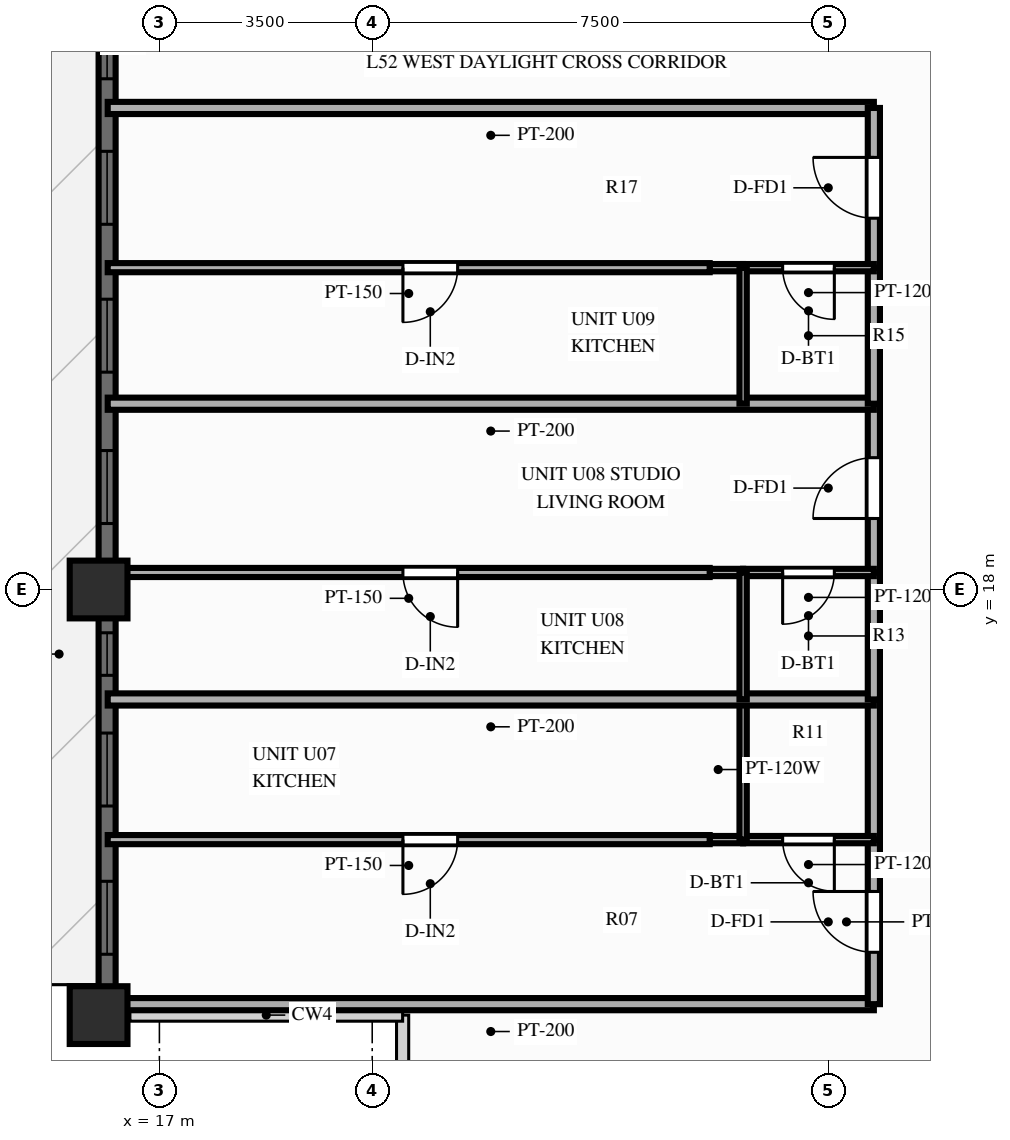
"""IFC4 building model, lengths in metres.
Left out: names, types, materials, properties, quantities, classifications, styles, units other than length and angle.
Written with IfcOpenShell. Run it as: python <this file> out.ifc"""

import sys

from ifc_helpers import new_model, si_unit, direction, frame, frame_2d, origin, origin_2d, place, context, subcontext, project, spatial, rectangle, extrude, source, transform, mapped, element, fill, save


model = new_model("IFC4")
c1 = context("Model", 3, precision=1e-05, world=origin(), true_north=direction((0.0, 1.0)))
c2 = subcontext(c1, "Body", "Model", "MODEL_VIEW")
j1 = project(units=[si_unit("LENGTHUNIT", "METRE"), si_unit("PLANEANGLEUNIT", "RADIAN")], contexts=[c1])
p1 = place(None, origin())
s1 = spatial("IfcSite", under=j1, at=p1, CompositionType="ELEMENT")
p2 = place(p1, origin())
s2 = spatial("IfcBuilding", under=s1, at=p2, CompositionType="ELEMENT")
p3 = place(p2, frame((0.0, 0.0, 166.0)))
s3 = spatial("IfcBuildingStorey", under=s2, at=p3, CompositionType="ELEMENT", Elevation=166.0)
m1 = source(origin(), c2, "Body", "SweptSolid", [
    extrude(rectangle(XDim=0.95, YDim=0.95, at=origin_2d()), origin(), (0.0, 0.0, 1.0), 3.0),
])
for number, where, z_axis, x_axis in (
    (1, (16.0, 18.0, 0.0), (0.0, 0.0, 1.0), (1.0, 0.0, 0.0)),
    (2, (16.0, 11.0, 0.0), (0.0, 0.0, 1.0), (1.0, 0.0, 0.0)),
):
    element("IfcColumn", number, at=place(p3, frame(where, z_axis=z_axis, x_axis=x_axis)), inside=s3, PredefinedType="COLUMN", context=c2, shape_type="MappedRepresentation", body=[
        mapped(m1, transform((0.0, 0.0, 0.0), scale=1.0)),
    ])
p4 = place(p3, frame((16.14, 11.0, 0.0), z_axis=(0.0, 0.0, 1.0), x_axis=(0.0, 1.0, 0.0)))
e3 = element("IfcWall", 3, at=p4, inside=s3, PredefinedType="SOLIDWALL", context=c2, shape_type="SweptSolid", body=[
    extrude(rectangle(XDim=32.0, YDim=0.28, at=frame_2d((16.0, 0.0))), origin(), (0.0, 0.0, 1.0), 2.28),
])
p5 = place(p4, frame((1.001, 0.0, 0.25)))
e4 = element("IfcOpeningElement", 4, at=p5, cuts=e3, PredefinedType="OPENING", context=c2, shape_type="SweptSolid", body=[
    extrude(rectangle(XDim=1.2, YDim=1.5, at=frame_2d((0.6, 0.75))), frame((0.0, 0.152, 0.0), z_axis=(0.0, -1.0, 0.0), x_axis=(1.0, 0.0, 0.0)), (0.0, 0.0, 1.0), 0.304),
])
p6 = place(p4, frame((3.439, 0.0, 0.25)))
e5 = element("IfcOpeningElement", 5, at=p6, cuts=e3, PredefinedType="OPENING", context=c2, shape_type="SweptSolid", body=[
    extrude(rectangle(XDim=1.2, YDim=1.5, at=frame_2d((0.6, 0.75))), frame((0.0, 0.152, 0.0), z_axis=(0.0, -1.0, 0.0), x_axis=(1.0, 0.0, 0.0)), (0.0, 0.0, 1.0), 0.304),
])
p7 = place(p4, frame((5.588, 0.0, 0.25)))
e6 = element("IfcOpeningElement", 6, at=p7, cuts=e3, PredefinedType="OPENING", context=c2, shape_type="SweptSolid", body=[
    extrude(rectangle(XDim=0.7, YDim=1.5, at=frame_2d((0.35, 0.75))), frame((0.0, 0.152, 0.0), z_axis=(0.0, -1.0, 0.0), x_axis=(1.0, 0.0, 0.0)), (0.0, 0.0, 1.0), 0.304),
])
p8 = place(p4, frame((8.085, 0.0, 0.25)))
e7 = element("IfcOpeningElement", 7, at=p8, cuts=e3, PredefinedType="OPENING", context=c2, shape_type="SweptSolid", body=[
    extrude(rectangle(XDim=1.2, YDim=1.5, at=frame_2d((0.6, 0.75))), frame((0.0, 0.152, 0.0), z_axis=(0.0, -1.0, 0.0), x_axis=(1.0, 0.0, 0.0)), (0.0, 0.0, 1.0), 0.304),
])
p9 = place(p4, frame((10.575, 0.0, 0.25)))
e8 = element("IfcOpeningElement", 8, at=p9, cuts=e3, PredefinedType="OPENING", context=c2, shape_type="SweptSolid", body=[
    extrude(rectangle(XDim=1.2, YDim=1.5, at=frame_2d((0.6, 0.75))), frame((0.0, 0.152, 0.0), z_axis=(0.0, -1.0, 0.0), x_axis=(1.0, 0.0, 0.0)), (0.0, 0.0, 1.0), 0.304),
])
p10 = place(p4, frame((13.007, 0.0, 0.25)))
e9 = element("IfcOpeningElement", 9, at=p10, cuts=e3, PredefinedType="OPENING", context=c2, shape_type="SweptSolid", body=[
    extrude(rectangle(XDim=1.2, YDim=1.5, at=frame_2d((0.6, 0.75))), frame((0.0, 0.152, 0.0), z_axis=(0.0, -1.0, 0.0), x_axis=(1.0, 0.0, 0.0)), (0.0, 0.0, 1.0), 0.304),
])
p11 = place(p4, frame((15.4, 0.0, 0.25)))
e10 = element("IfcOpeningElement", 10, at=p11, cuts=e3, PredefinedType="OPENING", context=c2, shape_type="SweptSolid", body=[
    extrude(rectangle(XDim=1.2, YDim=1.5, at=frame_2d((0.6, 0.75))), frame((0.0, 0.152, 0.0), z_axis=(0.0, -1.0, 0.0), x_axis=(1.0, 0.0, 0.0)), (0.0, 0.0, 1.0), 0.304),
])
p12 = place(p4, frame((17.673, 0.0, 0.0)))
e11 = element("IfcOpeningElement", 11, at=p12, cuts=e3, PredefinedType="OPENING", context=c2, shape_type="SweptSolid", body=[
    extrude(rectangle(XDim=1.6, YDim=2.15, at=frame_2d((0.8, 1.075))), frame((0.0, 0.152, 0.0), z_axis=(0.0, -1.0, 0.0), x_axis=(1.0, 0.0, 0.0)), (0.0, 0.0, 1.0), 0.304),
])
p13 = place(p4, frame((20.452, 0.0, 0.25)))
e12 = element("IfcOpeningElement", 12, at=p13, cuts=e3, PredefinedType="OPENING", context=c2, shape_type="SweptSolid", body=[
    extrude(rectangle(XDim=1.2, YDim=1.5, at=frame_2d((0.6, 0.75))), frame((0.0, 0.152, 0.0), z_axis=(0.0, -1.0, 0.0), x_axis=(1.0, 0.0, 0.0)), (0.0, 0.0, 1.0), 0.304),
])
p14 = place(p4, frame((22.862, 0.0, 0.25)))
e13 = element("IfcOpeningElement", 13, at=p14, cuts=e3, PredefinedType="OPENING", context=c2, shape_type="SweptSolid", body=[
    extrude(rectangle(XDim=1.2, YDim=1.5, at=frame_2d((0.6, 0.75))), frame((0.0, 0.152, 0.0), z_axis=(0.0, -1.0, 0.0), x_axis=(1.0, 0.0, 0.0)), (0.0, 0.0, 1.0), 0.304),
])
p15 = place(p4, frame((25.734, 0.0, 0.25)))
e14 = element("IfcOpeningElement", 14, at=p15, cuts=e3, PredefinedType="OPENING", context=c2, shape_type="SweptSolid", body=[
    extrude(rectangle(XDim=0.95, YDim=1.5, at=frame_2d((0.475, 0.75))), frame((0.0, 0.152, 0.0), z_axis=(0.0, -1.0, 0.0), x_axis=(1.0, 0.0, 0.0)), (0.0, 0.0, 1.0), 0.304),
])
p16 = place(p4, frame((27.588, 0.0, 0.25)))
e15 = element("IfcOpeningElement", 15, at=p16, cuts=e3, PredefinedType="OPENING", context=c2, shape_type="SweptSolid", body=[
    extrude(rectangle(XDim=1.2, YDim=1.5, at=frame_2d((0.6, 0.75))), frame((0.0, 0.152, 0.0), z_axis=(0.0, -1.0, 0.0), x_axis=(1.0, 0.0, 0.0)), (0.0, 0.0, 1.0), 0.304),
])
p17 = place(p4, frame((29.879, 0.0, 0.25)))
e16 = element("IfcOpeningElement", 16, at=p17, cuts=e3, PredefinedType="OPENING", context=c2, shape_type="SweptSolid", body=[
    extrude(rectangle(XDim=1.2, YDim=1.5, at=frame_2d((0.6, 0.75))), frame((0.0, 0.152, 0.0), z_axis=(0.0, -1.0, 0.0), x_axis=(1.0, 0.0, 0.0)), (0.0, 0.0, 1.0), 0.304),
])
for number, where, z_axis, x_axis in (
    (17, (28.75, 11.18, 0.0), (0.0, 0.0, 1.0), (-1.0, 0.0, 0.0)),
    (18, (28.75, 25.92, 0.0), (0.0, 0.0, 1.0), (-1.0, 0.0, 0.0)),
):
    element("IfcWall", number, at=place(p3, frame(where, z_axis=z_axis, x_axis=x_axis)), inside=s3, PredefinedType="PARTITIONING", context=c2, shape_type="SweptSolid", body=[
        extrude(rectangle(XDim=12.6, YDim=0.2, at=frame_2d((6.3, 0.0))), origin(), (0.0, 0.0, 1.0), 2.79),
    ])
p18 = place(p3, frame((28.75, 11.18, 0.0), z_axis=(0.0, 0.0, 1.0), x_axis=(0.0, 1.0, 0.0)))
e19 = element("IfcWall", 19, at=p18, inside=s3, PredefinedType="PARTITIONING", context=c2, shape_type="SweptSolid", body=[
    extrude(rectangle(XDim=2.706, YDim=0.2, at=frame_2d((1.353, 0.0))), origin(), (0.0, 0.0, 1.0), 2.79),
])
p19 = place(p18, frame((0.853, 0.0, 0.0)))
e20 = element("IfcOpeningElement", 20, at=p19, cuts=e19, PredefinedType="OPENING", context=c2, shape_type="SweptSolid", body=[
    extrude(rectangle(XDim=1.0, YDim=2.15, at=frame_2d((0.5, 1.075))), frame((0.0, 0.112, 0.0), z_axis=(0.0, -1.0, 0.0), x_axis=(1.0, 0.0, 0.0)), (0.0, 0.0, 1.0), 0.224),
])
p20 = place(p3, frame((28.75, 13.886, 0.0), z_axis=(0.0, 0.0, 1.0), x_axis=(0.0, 1.0, 0.0)))
e21 = element("IfcWall", 21, at=p20, inside=s3, PredefinedType="PARTITIONING", context=c2, shape_type="SweptSolid", body=[
    extrude(rectangle(XDim=2.305, YDim=0.2, at=frame_2d((1.153, 0.0))), origin(), (0.0, 0.0, 1.0), 2.79),
])
p21 = place(p3, frame((28.75, 13.886, 0.0), z_axis=(0.0, 0.0, 1.0), x_axis=(-1.0, 0.0, 0.0)))
e22 = element("IfcWall", 22, at=p21, inside=s3, PredefinedType="PARTITIONING", context=c2, shape_type="SweptSolid", body=[
    extrude(rectangle(XDim=2.15, YDim=0.12, at=frame_2d((1.075, 0.0))), origin(), (0.0, 0.0, 1.0), 2.79),
])
p22 = place(p21, frame((0.65, 0.0, 0.0)))
e23 = element("IfcOpeningElement", 23, at=p22, cuts=e22, PredefinedType="OPENING", context=c2, shape_type="SweptSolid", body=[
    extrude(rectangle(XDim=0.85, YDim=2.05, at=frame_2d((0.425, 1.025))), frame((0.0, 0.072, 0.0), z_axis=(0.0, -1.0, 0.0), x_axis=(1.0, 0.0, 0.0)), (0.0, 0.0, 1.0), 0.144),
])
p23 = place(p3, frame((26.6, 13.886, 0.0), z_axis=(0.0, 0.0, 1.0), x_axis=(-1.0, 0.0, 0.0)))
e24 = element("IfcWall", 24, at=p23, inside=s3, PredefinedType="PARTITIONING", context=c2, shape_type="SweptSolid", body=[
    extrude(rectangle(XDim=0.55, YDim=0.12, at=frame_2d((0.275, 0.0))), origin(), (0.0, 0.0, 1.0), 2.79),
])
p24 = place(p3, frame((26.6, 13.886, 0.0), z_axis=(0.0, 0.0, 1.0), x_axis=(0.0, 1.0, 0.0)))
e25 = element("IfcWall", 25, at=p24, inside=s3, PredefinedType="PARTITIONING", context=c2, shape_type="SweptSolid", body=[
    extrude(rectangle(XDim=2.305, YDim=0.12, at=frame_2d((1.153, 0.0))), origin(), (0.0, 0.0, 1.0), 2.79),
])
p25 = place(p3, frame((26.05, 13.886, 0.0), z_axis=(0.0, 0.0, 1.0), x_axis=(-1.0, 0.0, 0.0)))
e26 = element("IfcWall", 26, at=p25, inside=s3, PredefinedType="PARTITIONING", context=c2, shape_type="SweptSolid", body=[
    extrude(rectangle(XDim=9.9, YDim=0.15, at=frame_2d((4.95, 0.0))), origin(), (0.0, 0.0, 1.0), 2.79),
])
p26 = place(p25, frame((4.145, 0.0, 0.0)))
e27 = element("IfcOpeningElement", 27, at=p26, cuts=e26, PredefinedType="OPENING", context=c2, shape_type="SweptSolid", body=[
    extrude(rectangle(XDim=0.9, YDim=2.1, at=frame_2d((0.45, 1.05))), frame((0.0, 0.087, 0.0), z_axis=(0.0, -1.0, 0.0), x_axis=(1.0, 0.0, 0.0)), (0.0, 0.0, 1.0), 0.174),
])
p27 = place(p3, frame((28.75, 16.192, 0.0), z_axis=(0.0, 0.0, 1.0), x_axis=(-1.0, 0.0, 0.0)))
e28 = element("IfcWall", 28, at=p27, inside=s3, PredefinedType="PARTITIONING", context=c2, shape_type="SweptSolid", body=[
    extrude(rectangle(XDim=12.6, YDim=0.2, at=frame_2d((6.3, 0.0))), origin(), (0.0, 0.0, 1.0), 2.79),
])
p28 = place(p3, frame((28.75, 16.192, 0.0), z_axis=(0.0, 0.0, 1.0), x_axis=(0.0, 1.0, 0.0)))
e29 = element("IfcWall", 29, at=p28, inside=s3, PredefinedType="PARTITIONING", context=c2, shape_type="SweptSolid", body=[
    extrude(rectangle(XDim=2.088, YDim=0.2, at=frame_2d((1.044, 0.0))), origin(), (0.0, 0.0, 1.0), 2.79),
])
p29 = place(p3, frame((28.75, 18.28, 0.0), z_axis=(0.0, 0.0, 1.0), x_axis=(0.0, 1.0, 0.0)))
e30 = element("IfcWall", 30, at=p29, inside=s3, PredefinedType="PARTITIONING", context=c2, shape_type="SweptSolid", body=[
    extrude(rectangle(XDim=2.776, YDim=0.2, at=frame_2d((1.388, 0.0))), origin(), (0.0, 0.0, 1.0), 2.79),
])
p30 = place(p29, frame((0.888, 0.0, 0.0)))
e31 = element("IfcOpeningElement", 31, at=p30, cuts=e30, PredefinedType="OPENING", context=c2, shape_type="SweptSolid", body=[
    extrude(rectangle(XDim=1.0, YDim=2.15, at=frame_2d((0.5, 1.075))), frame((0.0, 0.112, 0.0), z_axis=(0.0, -1.0, 0.0), x_axis=(1.0, 0.0, 0.0)), (0.0, 0.0, 1.0), 0.224),
])
p31 = place(p3, frame((28.75, 18.28, 0.0), z_axis=(0.0, 0.0, 1.0), x_axis=(-1.0, 0.0, 0.0)))
e32 = element("IfcWall", 32, at=p31, inside=s3, PredefinedType="PARTITIONING", context=c2, shape_type="SweptSolid", body=[
    extrude(rectangle(XDim=2.15, YDim=0.12, at=frame_2d((1.075, 0.0))), origin(), (0.0, 0.0, 1.0), 2.79),
])
p32 = place(p31, frame((0.65, 0.0, 0.0)))
e33 = element("IfcOpeningElement", 33, at=p32, cuts=e32, PredefinedType="OPENING", context=c2, shape_type="SweptSolid", body=[
    extrude(rectangle(XDim=0.85, YDim=2.05, at=frame_2d((0.425, 1.025))), frame((0.0, 0.072, 0.0), z_axis=(0.0, -1.0, 0.0), x_axis=(1.0, 0.0, 0.0)), (0.0, 0.0, 1.0), 0.144),
])
p33 = place(p3, frame((26.6, 18.28, 0.0), z_axis=(0.0, 0.0, 1.0), x_axis=(-1.0, 0.0, 0.0)))
e34 = element("IfcWall", 34, at=p33, inside=s3, PredefinedType="PARTITIONING", context=c2, shape_type="SweptSolid", body=[
    extrude(rectangle(XDim=0.55, YDim=0.12, at=frame_2d((0.275, 0.0))), origin(), (0.0, 0.0, 1.0), 2.79),
])
p34 = place(p3, frame((26.6, 16.192, 0.0), z_axis=(0.0, 0.0, 1.0), x_axis=(0.0, 1.0, 0.0)))
e35 = element("IfcWall", 35, at=p34, inside=s3, PredefinedType="PARTITIONING", context=c2, shape_type="SweptSolid", body=[
    extrude(rectangle(XDim=2.088, YDim=0.12, at=frame_2d((1.044, 0.0))), origin(), (0.0, 0.0, 1.0), 2.79),
])
p35 = place(p3, frame((26.05, 18.28, 0.0), z_axis=(0.0, 0.0, 1.0), x_axis=(-1.0, 0.0, 0.0)))
e36 = element("IfcWall", 36, at=p35, inside=s3, PredefinedType="PARTITIONING", context=c2, shape_type="SweptSolid", body=[
    extrude(rectangle(XDim=9.9, YDim=0.15, at=frame_2d((4.95, 0.0))), origin(), (0.0, 0.0, 1.0), 2.79),
])
p36 = place(p35, frame((4.145, 0.0, 0.0)))
e37 = element("IfcOpeningElement", 37, at=p36, cuts=e36, PredefinedType="OPENING", context=c2, shape_type="SweptSolid", body=[
    extrude(rectangle(XDim=0.9, YDim=2.1, at=frame_2d((0.45, 1.05))), frame((0.0, 0.087, 0.0), z_axis=(0.0, -1.0, 0.0), x_axis=(1.0, 0.0, 0.0)), (0.0, 0.0, 1.0), 0.174),
])
p37 = place(p3, frame((28.75, 21.056, 0.0), z_axis=(0.0, 0.0, 1.0), x_axis=(-1.0, 0.0, 0.0)))
e38 = element("IfcWall", 38, at=p37, inside=s3, PredefinedType="PARTITIONING", context=c2, shape_type="SweptSolid", body=[
    extrude(rectangle(XDim=12.6, YDim=0.2, at=frame_2d((6.3, 0.0))), origin(), (0.0, 0.0, 1.0), 2.79),
])
p38 = place(p3, frame((28.75, 21.056, 0.0), z_axis=(0.0, 0.0, 1.0), x_axis=(0.0, 1.0, 0.0)))
e39 = element("IfcWall", 39, at=p38, inside=s3, PredefinedType="PARTITIONING", context=c2, shape_type="SweptSolid", body=[
    extrude(rectangle(XDim=2.237, YDim=0.2, at=frame_2d((1.119, 0.0))), origin(), (0.0, 0.0, 1.0), 2.79),
])
p39 = place(p3, frame((28.75, 23.293, 0.0), z_axis=(0.0, 0.0, 1.0), x_axis=(0.0, 1.0, 0.0)))
e40 = element("IfcWall", 40, at=p39, inside=s3, PredefinedType="PARTITIONING", context=c2, shape_type="SweptSolid", body=[
    extrude(rectangle(XDim=2.627, YDim=0.2, at=frame_2d((1.313, 0.0))), origin(), (0.0, 0.0, 1.0), 2.79),
])
p40 = place(p39, frame((0.813, 0.0, 0.0)))
e41 = element("IfcOpeningElement", 41, at=p40, cuts=e40, PredefinedType="OPENING", context=c2, shape_type="SweptSolid", body=[
    extrude(rectangle(XDim=1.0, YDim=2.15, at=frame_2d((0.5, 1.075))), frame((0.0, 0.112, 0.0), z_axis=(0.0, -1.0, 0.0), x_axis=(1.0, 0.0, 0.0)), (0.0, 0.0, 1.0), 0.224),
])
p41 = place(p3, frame((28.75, 23.293, 0.0), z_axis=(0.0, 0.0, 1.0), x_axis=(-1.0, 0.0, 0.0)))
e42 = element("IfcWall", 42, at=p41, inside=s3, PredefinedType="PARTITIONING", context=c2, shape_type="SweptSolid", body=[
    extrude(rectangle(XDim=2.15, YDim=0.12, at=frame_2d((1.075, 0.0))), origin(), (0.0, 0.0, 1.0), 2.79),
])
p42 = place(p41, frame((0.65, 0.0, 0.0)))
e43 = element("IfcOpeningElement", 43, at=p42, cuts=e42, PredefinedType="OPENING", context=c2, shape_type="SweptSolid", body=[
    extrude(rectangle(XDim=0.85, YDim=2.05, at=frame_2d((0.425, 1.025))), frame((0.0, 0.072, 0.0), z_axis=(0.0, -1.0, 0.0), x_axis=(1.0, 0.0, 0.0)), (0.0, 0.0, 1.0), 0.144),
])
p43 = place(p3, frame((26.6, 23.293, 0.0), z_axis=(0.0, 0.0, 1.0), x_axis=(-1.0, 0.0, 0.0)))
e44 = element("IfcWall", 44, at=p43, inside=s3, PredefinedType="PARTITIONING", context=c2, shape_type="SweptSolid", body=[
    extrude(rectangle(XDim=0.55, YDim=0.12, at=frame_2d((0.275, 0.0))), origin(), (0.0, 0.0, 1.0), 2.79),
])
p44 = place(p3, frame((26.6, 21.056, 0.0), z_axis=(0.0, 0.0, 1.0), x_axis=(0.0, 1.0, 0.0)))
e45 = element("IfcWall", 45, at=p44, inside=s3, PredefinedType="PARTITIONING", context=c2, shape_type="SweptSolid", body=[
    extrude(rectangle(XDim=2.237, YDim=0.12, at=frame_2d((1.119, 0.0))), origin(), (0.0, 0.0, 1.0), 2.79),
])
p45 = place(p3, frame((26.05, 23.293, 0.0), z_axis=(0.0, 0.0, 1.0), x_axis=(-1.0, 0.0, 0.0)))
e46 = element("IfcWall", 46, at=p45, inside=s3, PredefinedType="PARTITIONING", context=c2, shape_type="SweptSolid", body=[
    extrude(rectangle(XDim=9.9, YDim=0.15, at=frame_2d((4.95, 0.0))), origin(), (0.0, 0.0, 1.0), 2.79),
])
p46 = place(p45, frame((4.145, 0.0, 0.0)))
e47 = element("IfcOpeningElement", 47, at=p46, cuts=e46, PredefinedType="OPENING", context=c2, shape_type="SweptSolid", body=[
    extrude(rectangle(XDim=0.9, YDim=2.1, at=frame_2d((0.45, 1.05))), frame((0.0, 0.087, 0.0), z_axis=(0.0, -1.0, 0.0), x_axis=(1.0, 0.0, 0.0)), (0.0, 0.0, 1.0), 0.174),
])
m2 = source(origin(), c2, "Body", "SweptSolid", [
    extrude(rectangle(XDim=1.2, YDim=1.5, at=frame_2d((0.6, 0.75))), frame((0.0, 0.03, 0.0), z_axis=(0.0, -1.0, 0.0), x_axis=(1.0, 0.0, 0.0)), (0.0, 0.0, 1.0), 0.06),
])
p47 = place(p5, origin())
e48 = element("IfcWindow", 48, at=p47, inside=s3, PartitioningType="SINGLE_PANEL", PredefinedType="WINDOW", context=c2, shape_type="MappedRepresentation", body=[
    mapped(m2, transform((0.0, 0.0, 0.0), scale=1.0)),
])
fill(e4, e48)
p48 = place(p6, origin())
e49 = element("IfcWindow", 49, at=p48, inside=s3, PartitioningType="SINGLE_PANEL", PredefinedType="WINDOW", context=c2, shape_type="MappedRepresentation", body=[
    mapped(m2, transform((0.0, 0.0, 0.0), scale=1.0)),
])
fill(e5, e49)
m3 = source(origin(), c2, "Body", "SweptSolid", [
    extrude(rectangle(XDim=0.7, YDim=1.5, at=frame_2d((0.35, 0.75))), frame((0.0, 0.03, 0.0), z_axis=(0.0, -1.0, 0.0), x_axis=(1.0, 0.0, 0.0)), (0.0, 0.0, 1.0), 0.06),
])
p49 = place(p7, origin())
e50 = element("IfcWindow", 50, at=p49, inside=s3, PartitioningType="SINGLE_PANEL", PredefinedType="WINDOW", context=c2, shape_type="MappedRepresentation", body=[
    mapped(m3, transform((0.0, 0.0, 0.0), scale=1.0)),
])
fill(e6, e50)
p50 = place(p8, origin())
e51 = element("IfcWindow", 51, at=p50, inside=s3, PartitioningType="SINGLE_PANEL", PredefinedType="WINDOW", context=c2, shape_type="MappedRepresentation", body=[
    mapped(m2, transform((0.0, 0.0, 0.0), scale=1.0)),
])
fill(e7, e51)
p51 = place(p9, origin())
e52 = element("IfcWindow", 52, at=p51, inside=s3, PartitioningType="SINGLE_PANEL", PredefinedType="WINDOW", context=c2, shape_type="MappedRepresentation", body=[
    mapped(m2, transform((0.0, 0.0, 0.0), scale=1.0)),
])
fill(e8, e52)
p52 = place(p10, origin())
e53 = element("IfcWindow", 53, at=p52, inside=s3, PartitioningType="SINGLE_PANEL", PredefinedType="WINDOW", context=c2, shape_type="MappedRepresentation", body=[
    mapped(m2, transform((0.0, 0.0, 0.0), scale=1.0)),
])
fill(e9, e53)
p53 = place(p11, origin())
e54 = element("IfcWindow", 54, at=p53, inside=s3, PartitioningType="SINGLE_PANEL", PredefinedType="WINDOW", context=c2, shape_type="MappedRepresentation", body=[
    mapped(m2, transform((0.0, 0.0, 0.0), scale=1.0)),
])
fill(e10, e54)
m4 = source(origin(), c2, "Body", "SweptSolid", [
    extrude(rectangle(XDim=1.0, YDim=2.15, at=frame_2d((0.5, 1.075))), frame((0.0, 0.025, 0.0), z_axis=(0.0, -1.0, 0.0), x_axis=(1.0, 0.0, 0.0)), (0.0, 0.0, 1.0), 0.05),
])
p54 = place(p19, origin())
e55 = element("IfcDoor", 55, at=p54, inside=s3, OperationType="SINGLE_SWING_RIGHT", PredefinedType="DOOR", context=c2, shape_type="MappedRepresentation", body=[
    mapped(m4, transform((0.0, 0.0, 0.0), scale=1.0)),
])
fill(e20, e55)
m5 = source(origin(), c2, "Body", "SweptSolid", [
    extrude(rectangle(XDim=0.85, YDim=2.05, at=frame_2d((0.425, 1.025))), frame((0.0, 0.025, 0.0), z_axis=(0.0, -1.0, 0.0), x_axis=(1.0, 0.0, 0.0)), (0.0, 0.0, 1.0), 0.05),
])
p55 = place(p22, origin())
e56 = element("IfcDoor", 56, at=p55, inside=s3, OperationType="SINGLE_SWING_LEFT", PredefinedType="DOOR", context=c2, shape_type="MappedRepresentation", body=[
    mapped(m5, transform((0.0, 0.0, 0.0), scale=1.0)),
])
fill(e23, e56)
m6 = source(origin(), c2, "Body", "SweptSolid", [
    extrude(rectangle(XDim=0.9, YDim=2.1, at=frame_2d((0.45, 1.05))), frame((0.0, 0.025, 0.0), z_axis=(0.0, -1.0, 0.0), x_axis=(1.0, 0.0, 0.0)), (0.0, 0.0, 1.0), 0.05),
])
p56 = place(p26, origin())
e57 = element("IfcDoor", 57, at=p56, inside=s3, OperationType="SINGLE_SWING_RIGHT", PredefinedType="DOOR", context=c2, shape_type="MappedRepresentation", body=[
    mapped(m6, transform((0.0, 0.0, 0.0), scale=1.0)),
])
fill(e27, e57)
p57 = place(p30, origin())
e58 = element("IfcDoor", 58, at=p57, inside=s3, OperationType="SINGLE_SWING_LEFT", PredefinedType="DOOR", context=c2, shape_type="MappedRepresentation", body=[
    mapped(m4, transform((0.0, 0.0, 0.0), scale=1.0)),
])
fill(e31, e58)
p58 = place(p32, origin())
e59 = element("IfcDoor", 59, at=p58, inside=s3, OperationType="SINGLE_SWING_RIGHT", PredefinedType="DOOR", context=c2, shape_type="MappedRepresentation", body=[
    mapped(m5, transform((0.0, 0.0, 0.0), scale=1.0)),
])
fill(e33, e59)
p59 = place(p36, origin())
e60 = element("IfcDoor", 60, at=p59, inside=s3, OperationType="SINGLE_SWING_LEFT", PredefinedType="DOOR", context=c2, shape_type="MappedRepresentation", body=[
    mapped(m6, transform((0.0, 0.0, 0.0), scale=1.0)),
])
fill(e37, e60)
p60 = place(p40, origin())
e61 = element("IfcDoor", 61, at=p60, inside=s3, OperationType="SINGLE_SWING_RIGHT", PredefinedType="DOOR", context=c2, shape_type="MappedRepresentation", body=[
    mapped(m4, transform((0.0, 0.0, 0.0), scale=1.0)),
])
fill(e41, e61)
p61 = place(p42, origin())
e62 = element("IfcDoor", 62, at=p61, inside=s3, OperationType="SINGLE_SWING_LEFT", PredefinedType="DOOR", context=c2, shape_type="MappedRepresentation", body=[
    mapped(m5, transform((0.0, 0.0, 0.0), scale=1.0)),
])
fill(e43, e62)
p62 = place(p46, origin())
e63 = element("IfcDoor", 63, at=p62, inside=s3, OperationType="SINGLE_SWING_RIGHT", PredefinedType="DOOR", context=c2, shape_type="MappedRepresentation", body=[
    mapped(m6, transform((0.0, 0.0, 0.0), scale=1.0)),
])
fill(e47, e63)
save(model, sys.argv[1])
